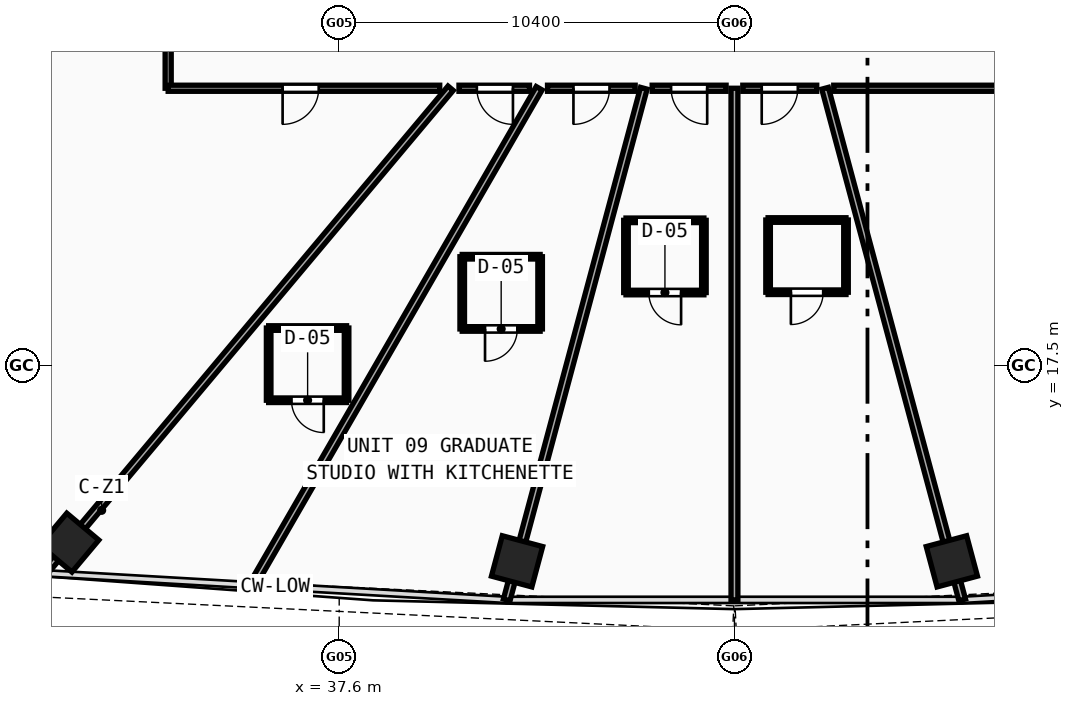
"""IFC4 building model, lengths in metres.
Left out: names, types, materials, properties, quantities, classifications, styles, units other than length and angle.
Written with IfcOpenShell. Run it as: python <this file> out.ifc"""

import sys

from ifc_helpers import new_model, si_unit, direction, frame, frame_2d, origin, origin_with_axes, origin_2d, place, context, subcontext, project, spatial, rectangle, hollow_rectangle, extrude, source, transform, mapped, element, fill, save


model = new_model("IFC4")
c1 = context("Model", 3, precision=1e-05, world=origin(), true_north=direction((0.0, 1.0)))
c2 = subcontext(c1, "Body", "Model", "MODEL_VIEW")
j1 = project(units=[si_unit("LENGTHUNIT", "METRE"), si_unit("PLANEANGLEUNIT", "RADIAN")], contexts=[c1])
p1 = place(None, origin())
s1 = spatial("IfcSite", under=j1, at=p1, CompositionType="ELEMENT")
p2 = place(p1, origin())
s2 = spatial("IfcBuilding", under=s1, at=p2, CompositionType="ELEMENT")
p3 = place(p2, frame((0.0, 0.0, 63.07)))
s3 = spatial("IfcBuildingStorey", under=s2, at=p3, CompositionType="ELEMENT", Elevation=63.07)
m1 = source(origin(), c2, "Body", "SweptSolid", [
    extrude(hollow_rectangle(XDim=1.1, YDim=1.1, WallThickness=0.045, at=origin_2d()), origin(), (0.0, 0.0, 1.0), 3.63),
])
for number, where, z_axis, x_axis in (
    (1, (30.5, 12.844, -0.26), (0.0, 0.0, 1.0), (0.766, -0.643, 0.0)),
    (2, (42.28, 12.352, -0.26), (0.0, 0.0, 1.0), (0.966, -0.259, 0.0)),
    (3, (53.72, 12.352, -0.26), (0.0, 0.0, 1.0), (0.966, 0.259, 0.0)),
):
    element("IfcColumn", number, at=place(p3, frame(where, z_axis=z_axis, x_axis=x_axis)), inside=s3, PredefinedType="COLUMN", context=c2, shape_type="MappedRepresentation", body=[
        mapped(m1, transform((0.0, 0.0, 0.0), scale=1.0)),
    ])
p4 = place(p3, frame((40.532, 24.8, 0.0), z_axis=(0.0, 0.0, 1.0), x_axis=(-0.642782945965, -0.766048356422, 0.0)))
e4 = element("IfcWall", 4, at=p4, inside=s3, PredefinedType="PARTITIONING", context=c2, shape_type="SweptSolid", body=[
    extrude(rectangle(XDim=16.657, YDim=0.18, at=frame_2d((8.329, 0.0))), origin(), (0.0, 0.0, 1.0), 2.67),
])
p5 = place(p3, frame((42.862, 24.8, 0.0), z_axis=(0.0, 0.0, 1.0), x_axis=(-0.499994448746, -0.866028608779, 0.0)))
e5 = element("IfcWall", 5, at=p5, inside=s3, PredefinedType="PARTITIONING", context=c2, shape_type="SweptSolid", body=[
    extrude(rectangle(XDim=15.099, YDim=0.18, at=frame_2d((7.55, 0.0))), origin(), (0.0, 0.0, 1.0), 2.67),
])
p6 = place(p3, frame((45.615, 24.8, 0.0), z_axis=(0.0, 0.0, 1.0), x_axis=(-0.258819267056, -0.965925766817, 0.0)))
e6 = element("IfcWall", 6, at=p6, inside=s3, PredefinedType="PARTITIONING", context=c2, shape_type="SweptSolid", body=[
    extrude(rectangle(XDim=13.937, YDim=0.18, at=frame_2d((6.969, 0.0))), origin(), (0.0, 0.0, 1.0), 2.67),
])
p7 = place(p3, frame((48.0, 24.8, 0.0), z_axis=(0.0, 0.0, 1.0), x_axis=(0.0, -1.0, 0.0)))
e7 = element("IfcWall", 7, at=p7, inside=s3, PredefinedType="PARTITIONING", context=c2, shape_type="SweptSolid", body=[
    extrude(rectangle(XDim=13.462, YDim=0.18, at=frame_2d((6.731, 0.0))), origin(), (0.0, 0.0, 1.0), 2.67),
])
p8 = place(p3, frame((50.385, 24.8, 0.0), z_axis=(0.0, 0.0, 1.0), x_axis=(0.258819267056, -0.965925766817, 0.0)))
e8 = element("IfcWall", 8, at=p8, inside=s3, PredefinedType="PARTITIONING", context=c2, shape_type="SweptSolid", body=[
    extrude(rectangle(XDim=13.937, YDim=0.18, at=frame_2d((6.969, 0.0))), origin(), (0.0, 0.0, 1.0), 2.67),
])
p9 = place(p3, frame((33.1, 24.8, 0.0), z_axis=(0.0, 0.0, 1.0), x_axis=(0.0, 1.0, 0.0)))
e9 = element("IfcWall", 9, at=p9, inside=s3, PredefinedType="PARTITIONING", context=c2, shape_type="SweptSolid", body=[
    extrude(rectangle(XDim=6.049, YDim=0.16, at=frame_2d((3.025, 0.0))), origin(), (0.0, 0.0, 1.0), 2.97),
])
p10 = place(p3, frame((63.55, 24.8, 0.0), z_axis=(0.0, 0.0, 1.0), x_axis=(-1.0, 0.0, 0.0)))
e10 = element("IfcWall", 10, at=p10, inside=s3, PredefinedType="PARTITIONING", context=c2, shape_type="SweptSolid", body=[
    extrude(rectangle(XDim=12.938, YDim=0.16, at=frame_2d((6.469, 0.0))), origin(), (0.0, 0.0, 1.0), 2.67),
])
p11 = place(p10, frame((5.878, 0.0, 0.0)))
e11 = element("IfcOpeningElement", 11, at=p11, cuts=e10, PredefinedType="OPENING", context=c2, shape_type="SweptSolid", body=[
    extrude(rectangle(XDim=0.95, YDim=2.1, at=frame_2d((0.475, 1.05))), frame((0.0, 0.09, 0.0), z_axis=(0.0, -1.0, 0.0), x_axis=(1.0, 0.0, 0.0)), (0.0, 0.0, 1.0), 0.18),
])
p12 = place(p3, frame((50.165, 24.8, 0.0), z_axis=(0.0, 0.0, 1.0), x_axis=(-1.0, 0.0, 0.0)))
e12 = element("IfcWall", 12, at=p12, inside=s3, PredefinedType="PARTITIONING", context=c2, shape_type="SweptSolid", body=[
    extrude(rectangle(XDim=1.945, YDim=0.16, at=frame_2d((0.972, 0.0))), origin(), (0.0, 0.0, 1.0), 3.37),
])
p13 = place(p12, frame((0.498, 0.0, 0.0)))
e13 = element("IfcOpeningElement", 13, at=p13, cuts=e12, PredefinedType="OPENING", context=c2, shape_type="SweptSolid", body=[
    extrude(rectangle(XDim=0.95, YDim=2.1, at=frame_2d((0.475, 1.05))), frame((0.0, 0.09, 0.0), z_axis=(0.0, -1.0, 0.0), x_axis=(1.0, 0.0, 0.0)), (0.0, 0.0, 1.0), 0.18),
])
p14 = place(p3, frame((47.78, 24.8, 0.0), z_axis=(0.0, 0.0, 1.0), x_axis=(-1.0, 0.0, 0.0)))
e14 = element("IfcWall", 14, at=p14, inside=s3, PredefinedType="PARTITIONING", context=c2, shape_type="SweptSolid", body=[
    extrude(rectangle(XDim=1.945, YDim=0.16, at=frame_2d((0.972, 0.0))), origin(), (0.0, 0.0, 1.0), 3.37),
])
p15 = place(p14, frame((0.497, 0.0, 0.0)))
e15 = element("IfcOpeningElement", 15, at=p15, cuts=e14, PredefinedType="OPENING", context=c2, shape_type="SweptSolid", body=[
    extrude(rectangle(XDim=0.95, YDim=2.1, at=frame_2d((0.475, 1.05))), frame((0.0, 0.09, 0.0), z_axis=(0.0, -1.0, 0.0), x_axis=(1.0, 0.0, 0.0)), (0.0, 0.0, 1.0), 0.18),
])
p16 = place(p3, frame((45.387, 24.8, 0.0), z_axis=(0.0, 0.0, 1.0), x_axis=(-1.0, 0.0, 0.0)))
e16 = element("IfcWall", 16, at=p16, inside=s3, PredefinedType="PARTITIONING", context=c2, shape_type="SweptSolid", body=[
    extrude(rectangle(XDim=2.306, YDim=0.16, at=frame_2d((1.153, 0.0))), origin(), (0.0, 0.0, 1.0), 3.37),
])
p17 = place(p16, frame((0.674, 0.0, 0.0)))
e17 = element("IfcOpeningElement", 17, at=p17, cuts=e16, PredefinedType="OPENING", context=c2, shape_type="SweptSolid", body=[
    extrude(rectangle(XDim=0.95, YDim=2.1, at=frame_2d((0.475, 1.05))), frame((0.0, 0.09, 0.0), z_axis=(0.0, -1.0, 0.0), x_axis=(1.0, 0.0, 0.0)), (0.0, 0.0, 1.0), 0.18),
])
p18 = place(p3, frame((42.608, 24.8, 0.0), z_axis=(0.0, 0.0, 1.0), x_axis=(-1.0, 0.0, 0.0)))
e18 = element("IfcWall", 18, at=p18, inside=s3, PredefinedType="PARTITIONING", context=c2, shape_type="SweptSolid", body=[
    extrude(rectangle(XDim=1.856, YDim=0.16, at=frame_2d((0.928, 0.0))), origin(), (0.0, 0.0, 1.0), 2.67),
])
p19 = place(p18, frame((0.436, 0.0, 0.0)))
e19 = element("IfcOpeningElement", 19, at=p19, cuts=e18, PredefinedType="OPENING", context=c2, shape_type="SweptSolid", body=[
    extrude(rectangle(XDim=0.95, YDim=2.1, at=frame_2d((0.475, 1.05))), frame((0.0, 0.09, 0.0), z_axis=(0.0, -1.0, 0.0), x_axis=(1.0, 0.0, 0.0)), (0.0, 0.0, 1.0), 0.18),
])
p20 = place(p3, frame((40.245, 24.8, 0.0), z_axis=(0.0, 0.0, 1.0), x_axis=(-1.0, 0.0, 0.0)))
e20 = element("IfcWall", 20, at=p20, inside=s3, PredefinedType="PARTITIONING", context=c2, shape_type="SweptSolid", body=[
    extrude(rectangle(XDim=7.145, YDim=0.16, at=frame_2d((3.572, 0.0))), origin(), (0.0, 0.0, 1.0), 2.97),
])
p21 = place(p20, frame((3.184, 0.0, 0.0)))
e21 = element("IfcOpeningElement", 21, at=p21, cuts=e20, PredefinedType="OPENING", context=c2, shape_type="SweptSolid", body=[
    extrude(rectangle(XDim=0.95, YDim=2.1, at=frame_2d((0.475, 1.05))), frame((0.0, 0.09, 0.0), z_axis=(0.0, -1.0, 0.0), x_axis=(1.0, 0.0, 0.0)), (0.0, 0.0, 1.0), 0.18),
])
p22 = place(p3, frame((35.744, 16.591, 0.0), z_axis=(0.0, 0.0, 1.0), x_axis=(1.0, 0.0, 0.0)))
e22 = element("IfcWall", 22, at=p22, inside=s3, PredefinedType="PARTITIONING", context=c2, shape_type="SweptSolid", body=[
    extrude(rectangle(XDim=2.05, YDim=0.12, at=frame_2d((1.025, 0.0))), origin(), (0.0, 0.0, 1.0), 3.37),
])
p23 = place(p22, frame((0.6, 0.0, 0.0)))
e23 = element("IfcOpeningElement", 23, at=p23, cuts=e22, PredefinedType="OPENING", context=c2, shape_type="SweptSolid", body=[
    extrude(rectangle(XDim=0.85, YDim=2.1, at=frame_2d((0.425, 1.05))), frame((0.0, 0.07, 0.0), z_axis=(0.0, -1.0, 0.0), x_axis=(1.0, 0.0, 0.0)), (0.0, 0.0, 1.0), 0.14),
])
p24 = place(p3, frame((37.794, 16.591, 0.0), z_axis=(0.0, 0.0, 1.0), x_axis=(0.0, 1.0, 0.0)))
e24 = element("IfcWall", 24, at=p24, inside=s3, PredefinedType="PARTITIONING", context=c2, shape_type="SweptSolid", body=[
    extrude(rectangle(XDim=1.9, YDim=0.12, at=frame_2d((0.95, 0.0))), origin(), (0.0, 0.0, 1.0), 2.97),
])
p25 = place(p3, frame((37.794, 18.491, 0.0), z_axis=(0.0, 0.0, 1.0), x_axis=(-1.0, 0.0, 0.0)))
e25 = element("IfcWall", 25, at=p25, inside=s3, PredefinedType="PARTITIONING", context=c2, shape_type="SweptSolid", body=[
    extrude(rectangle(XDim=2.05, YDim=0.12, at=frame_2d((1.025, 0.0))), origin(), (0.0, 0.0, 1.0), 3.37),
])
p26 = place(p3, frame((35.744, 18.491, 0.0), z_axis=(0.0, 0.0, 1.0), x_axis=(0.0, -1.0, 0.0)))
e26 = element("IfcWall", 26, at=p26, inside=s3, PredefinedType="PARTITIONING", context=c2, shape_type="SweptSolid", body=[
    extrude(rectangle(XDim=1.9, YDim=0.12, at=frame_2d((0.95, 0.0))), origin(), (0.0, 0.0, 1.0), 2.97),
])
p27 = place(p3, frame((40.837, 18.467, 0.0), z_axis=(0.0, 0.0, 1.0), x_axis=(1.0, 0.0, 0.0)))
e27 = element("IfcWall", 27, at=p27, inside=s3, PredefinedType="PARTITIONING", context=c2, shape_type="SweptSolid", body=[
    extrude(rectangle(XDim=2.05, YDim=0.12, at=frame_2d((1.025, 0.0))), origin(), (0.0, 0.0, 1.0), 3.37),
])
p28 = place(p27, frame((0.6, 0.0, 0.0)))
e28 = element("IfcOpeningElement", 28, at=p28, cuts=e27, PredefinedType="OPENING", context=c2, shape_type="SweptSolid", body=[
    extrude(rectangle(XDim=0.85, YDim=2.1, at=frame_2d((0.425, 1.05))), frame((0.0, 0.07, 0.0), z_axis=(0.0, -1.0, 0.0), x_axis=(1.0, 0.0, 0.0)), (0.0, 0.0, 1.0), 0.14),
])
p29 = place(p3, frame((42.887, 18.467, 0.0), z_axis=(0.0, 0.0, 1.0), x_axis=(0.0, 1.0, 0.0)))
e29 = element("IfcWall", 29, at=p29, inside=s3, PredefinedType="PARTITIONING", context=c2, shape_type="SweptSolid", body=[
    extrude(rectangle(XDim=1.9, YDim=0.12, at=frame_2d((0.95, 0.0))), origin(), (0.0, 0.0, 1.0), 3.37),
])
p30 = place(p3, frame((42.887, 20.367, 0.0), z_axis=(0.0, 0.0, 1.0), x_axis=(-1.0, 0.0, 0.0)))
e30 = element("IfcWall", 30, at=p30, inside=s3, PredefinedType="PARTITIONING", context=c2, shape_type="SweptSolid", body=[
    extrude(rectangle(XDim=2.05, YDim=0.12, at=frame_2d((1.025, 0.0))), origin(), (0.0, 0.0, 1.0), 3.37),
])
p31 = place(p3, frame((40.837, 20.367, 0.0), z_axis=(0.0, 0.0, 1.0), x_axis=(0.0, -1.0, 0.0)))
e31 = element("IfcWall", 31, at=p31, inside=s3, PredefinedType="PARTITIONING", context=c2, shape_type="SweptSolid", body=[
    extrude(rectangle(XDim=1.9, YDim=0.12, at=frame_2d((0.95, 0.0))), origin(), (0.0, 0.0, 1.0), 3.37),
])
p32 = place(p3, frame((45.146, 19.425, 0.0), z_axis=(0.0, 0.0, 1.0), x_axis=(1.0, 0.0, 0.0)))
e32 = element("IfcWall", 32, at=p32, inside=s3, PredefinedType="PARTITIONING", context=c2, shape_type="SweptSolid", body=[
    extrude(rectangle(XDim=2.05, YDim=0.12, at=frame_2d((1.025, 0.0))), origin(), (0.0, 0.0, 1.0), 3.37),
])
p33 = place(p32, frame((0.6, 0.0, 0.0)))
e33 = element("IfcOpeningElement", 33, at=p33, cuts=e32, PredefinedType="OPENING", context=c2, shape_type="SweptSolid", body=[
    extrude(rectangle(XDim=0.85, YDim=2.1, at=frame_2d((0.425, 1.05))), frame((0.0, 0.07, 0.0), z_axis=(0.0, -1.0, 0.0), x_axis=(1.0, 0.0, 0.0)), (0.0, 0.0, 1.0), 0.14),
])
p34 = place(p3, frame((47.196, 19.425, 0.0), z_axis=(0.0, 0.0, 1.0), x_axis=(0.0, 1.0, 0.0)))
e34 = element("IfcWall", 34, at=p34, inside=s3, PredefinedType="PARTITIONING", context=c2, shape_type="SweptSolid", body=[
    extrude(rectangle(XDim=1.9, YDim=0.12, at=frame_2d((0.95, 0.0))), origin(), (0.0, 0.0, 1.0), 3.37),
])
p35 = place(p3, frame((47.196, 21.325, 0.0), z_axis=(0.0, 0.0, 1.0), x_axis=(-1.0, 0.0, 0.0)))
e35 = element("IfcWall", 35, at=p35, inside=s3, PredefinedType="PARTITIONING", context=c2, shape_type="SweptSolid", body=[
    extrude(rectangle(XDim=2.05, YDim=0.12, at=frame_2d((1.025, 0.0))), origin(), (0.0, 0.0, 1.0), 3.37),
])
p36 = place(p3, frame((45.146, 21.325, 0.0), z_axis=(0.0, 0.0, 1.0), x_axis=(0.0, -1.0, 0.0)))
e36 = element("IfcWall", 36, at=p36, inside=s3, PredefinedType="PARTITIONING", context=c2, shape_type="SweptSolid", body=[
    extrude(rectangle(XDim=1.9, YDim=0.12, at=frame_2d((0.95, 0.0))), origin(), (0.0, 0.0, 1.0), 3.37),
])
p37 = place(p3, frame((48.885, 19.433, 0.0), z_axis=(0.0, 0.0, 1.0), x_axis=(1.0, 0.0, 0.0)))
e37 = element("IfcWall", 37, at=p37, inside=s3, PredefinedType="PARTITIONING", context=c2, shape_type="SweptSolid", body=[
    extrude(rectangle(XDim=2.05, YDim=0.12, at=frame_2d((1.025, 0.0))), origin(), (0.0, 0.0, 1.0), 3.37),
])
p38 = place(p37, frame((0.6, 0.0, 0.0)))
e38 = element("IfcOpeningElement", 38, at=p38, cuts=e37, PredefinedType="OPENING", context=c2, shape_type="SweptSolid", body=[
    extrude(rectangle(XDim=0.85, YDim=2.1, at=frame_2d((0.425, 1.05))), frame((0.0, 0.07, 0.0), z_axis=(0.0, -1.0, 0.0), x_axis=(1.0, 0.0, 0.0)), (0.0, 0.0, 1.0), 0.14),
])
p39 = place(p3, frame((50.935, 19.433, 0.0), z_axis=(0.0, 0.0, 1.0), x_axis=(0.0, 1.0, 0.0)))
e39 = element("IfcWall", 39, at=p39, inside=s3, PredefinedType="PARTITIONING", context=c2, shape_type="SweptSolid", body=[
    extrude(rectangle(XDim=1.9, YDim=0.12, at=frame_2d((0.95, 0.0))), origin(), (0.0, 0.0, 1.0), 3.37),
])
p40 = place(p3, frame((50.935, 21.333, 0.0), z_axis=(0.0, 0.0, 1.0), x_axis=(-1.0, 0.0, 0.0)))
e40 = element("IfcWall", 40, at=p40, inside=s3, PredefinedType="PARTITIONING", context=c2, shape_type="SweptSolid", body=[
    extrude(rectangle(XDim=2.05, YDim=0.12, at=frame_2d((1.025, 0.0))), origin(), (0.0, 0.0, 1.0), 3.37),
])
p41 = place(p3, frame((48.885, 21.333, 0.0), z_axis=(0.0, 0.0, 1.0), x_axis=(0.0, -1.0, 0.0)))
e41 = element("IfcWall", 41, at=p41, inside=s3, PredefinedType="PARTITIONING", context=c2, shape_type="SweptSolid", body=[
    extrude(rectangle(XDim=1.9, YDim=0.12, at=frame_2d((0.95, 0.0))), origin(), (0.0, 0.0, 1.0), 3.37),
])
m2 = source(origin(), c2, "Body", "SweptSolid", [
    extrude(rectangle(XDim=0.95, YDim=2.1, at=frame_2d((0.475, 1.05))), frame((0.0, 0.025, 0.0), z_axis=(0.0, -1.0, 0.0), x_axis=(1.0, 0.0, 0.0)), (0.0, 0.0, 1.0), 0.05),
])
p42 = place(p21, origin_with_axes())
e42 = element("IfcDoor", 42, at=p42, inside=s3, OperationType="SINGLE_SWING_RIGHT", PredefinedType="DOOR", context=c2, shape_type="MappedRepresentation", body=[
    mapped(m2, transform((0.0, 0.0, 0.0), scale=1.0)),
])
fill(e21, e42)
p43 = place(p19, origin_with_axes())
e43 = element("IfcDoor", 43, at=p43, inside=s3, OperationType="SINGLE_SWING_LEFT", PredefinedType="DOOR", context=c2, shape_type="MappedRepresentation", body=[
    mapped(m2, transform((0.0, 0.0, 0.0), scale=1.0)),
])
fill(e19, e43)
m3 = source(origin(), c2, "Body", "SweptSolid", [
    extrude(rectangle(XDim=0.85, YDim=2.1, at=frame_2d((0.425, 1.05))), frame((0.0, 0.025, 0.0), z_axis=(0.0, -1.0, 0.0), x_axis=(1.0, 0.0, 0.0)), (0.0, 0.0, 1.0), 0.05),
])
p44 = place(p23, frame((0.85, 0.0, 0.0), z_axis=(0.0, 0.0, 1.0), x_axis=(-1.0, 0.0, 0.0)))
e44 = element("IfcDoor", 44, at=p44, inside=s3, OperationType="SINGLE_SWING_LEFT", PredefinedType="DOOR", context=c2, shape_type="MappedRepresentation", body=[
    mapped(m3, transform((0.0, 0.0, 0.0), scale=1.0)),
])
fill(e23, e44)
p45 = place(p17, origin_with_axes())
e45 = element("IfcDoor", 45, at=p45, inside=s3, OperationType="SINGLE_SWING_RIGHT", PredefinedType="DOOR", context=c2, shape_type="MappedRepresentation", body=[
    mapped(m2, transform((0.0, 0.0, 0.0), scale=1.0)),
])
fill(e17, e45)
p46 = place(p28, frame((0.85, 0.0, 0.0), z_axis=(0.0, 0.0, 1.0), x_axis=(-1.0, 0.0, 0.0)))
e46 = element("IfcDoor", 46, at=p46, inside=s3, OperationType="SINGLE_SWING_RIGHT", PredefinedType="DOOR", context=c2, shape_type="MappedRepresentation", body=[
    mapped(m3, transform((0.0, 0.0, 0.0), scale=1.0)),
])
fill(e28, e46)
p47 = place(p15, origin_with_axes())
e47 = element("IfcDoor", 47, at=p47, inside=s3, OperationType="SINGLE_SWING_LEFT", PredefinedType="DOOR", context=c2, shape_type="MappedRepresentation", body=[
    mapped(m2, transform((0.0, 0.0, 0.0), scale=1.0)),
])
fill(e15, e47)
p48 = place(p33, frame((0.85, 0.0, 0.0), z_axis=(0.0, 0.0, 1.0), x_axis=(-1.0, 0.0, 0.0)))
e48 = element("IfcDoor", 48, at=p48, inside=s3, OperationType="SINGLE_SWING_LEFT", PredefinedType="DOOR", context=c2, shape_type="MappedRepresentation", body=[
    mapped(m3, transform((0.0, 0.0, 0.0), scale=1.0)),
])
fill(e33, e48)
p49 = place(p13, origin_with_axes())
e49 = element("IfcDoor", 49, at=p49, inside=s3, OperationType="SINGLE_SWING_RIGHT", PredefinedType="DOOR", context=c2, shape_type="MappedRepresentation", body=[
    mapped(m2, transform((0.0, 0.0, 0.0), scale=1.0)),
])
fill(e13, e49)
p50 = place(p38, frame((0.85, 0.0, 0.0), z_axis=(0.0, 0.0, 1.0), x_axis=(-1.0, 0.0, 0.0)))
e50 = element("IfcDoor", 50, at=p50, inside=s3, OperationType="SINGLE_SWING_RIGHT", PredefinedType="DOOR", context=c2, shape_type="MappedRepresentation", body=[
    mapped(m3, transform((0.0, 0.0, 0.0), scale=1.0)),
])
fill(e38, e50)
save(model, sys.argv[1])
